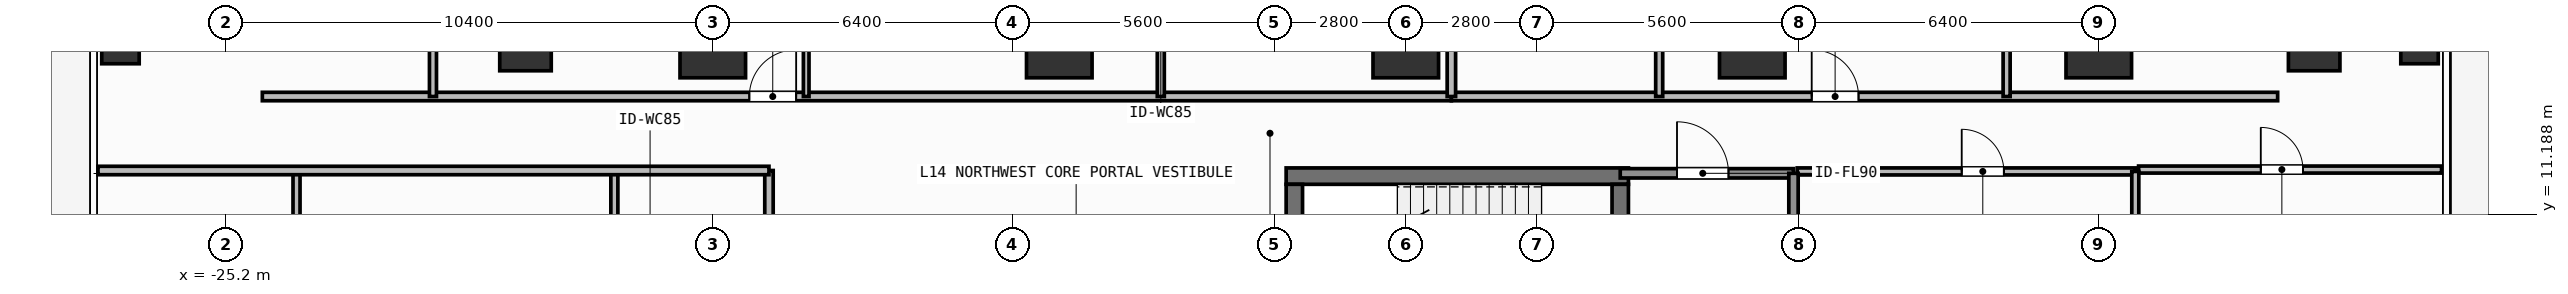
"""IFC4 building model, lengths in metres.
Left out: names, types, materials, properties, quantities, classifications, styles, units other than length and angle.
Written with IfcOpenShell. Run it as: python <this file> out.ifc"""

import sys

from ifc_helpers import new_model, si_unit, direction, frame, frame_2d, origin, origin_2d, place, context, subcontext, project, spatial, rectangle, hollow_rectangle, extrude, element, fill, save


model = new_model("IFC4")
c1 = context("Model", 3, precision=1e-05, world=origin(), true_north=direction((0.0, 1.0)))
c2 = subcontext(c1, "Body", "Model", "MODEL_VIEW")
j1 = project(units=[si_unit("LENGTHUNIT", "METRE"), si_unit("PLANEANGLEUNIT", "RADIAN")], contexts=[c1])
p1 = place(None, origin())
s1 = spatial("IfcSite", under=j1, at=p1, CompositionType="ELEMENT")
p2 = place(p1, origin())
s2 = spatial("IfcBuilding", under=s1, at=p2, CompositionType="ELEMENT")
p3 = place(p2, frame((0.0, 0.0, 54.0)))
s3 = spatial("IfcBuildingStorey", under=s2, at=p3, CompositionType="ELEMENT", Elevation=54.0)
p4 = place(p3, frame((-2.555, 12.0, 0.0), z_axis=(0.0, 0.0, 1.0), x_axis=(1.0, 0.0, 0.0)))
e1 = element("IfcWall", 1, at=p4, inside=s3, PredefinedType="SHEAR", context=c2, shape_type="SweptSolid", body=[
    extrude(rectangle(XDim=7.31, YDim=0.35, at=frame_2d((3.655, 0.0))), origin(), (0.0, 0.0, 1.0), 3.9),
])
p5 = place(p3, frame((-2.38, 8.9, 0.0), z_axis=(0.0, 0.0, 1.0), x_axis=(0.0, 1.0, 0.0)))
e2 = element("IfcWall", 2, at=p5, inside=s3, PredefinedType="SHEAR", context=c2, shape_type="SweptSolid", body=[
    extrude(rectangle(XDim=2.925, YDim=0.35, at=frame_2d((1.462, 0.0))), origin(), (0.0, 0.0, 1.0), 3.9),
])
p6 = place(p3, frame((4.58, 11.825, 0.0), z_axis=(0.0, 0.0, 1.0), x_axis=(0.0, -1.0, 0.0)))
e3 = element("IfcWall", 3, at=p6, inside=s3, PredefinedType="SHEAR", context=c2, shape_type="SweptSolid", body=[
    extrude(rectangle(XDim=2.925, YDim=0.35, at=frame_2d((1.462, 0.0))), origin(), (0.0, 0.0, 1.0), 3.9),
])
p7 = place(p6, frame((0.913, 0.0, 0.0)))
e4 = element("IfcOpeningElement", 4, at=p7, cuts=e3, PredefinedType="OPENING", context=c2, shape_type="SweptSolid", body=[
    extrude(rectangle(XDim=1.1, YDim=2.15, at=frame_2d((0.55, 1.075))), frame((0.0, 0.185, 0.0), z_axis=(0.0, -1.0, 0.0), x_axis=(1.0, 0.0, 0.0)), (0.0, 0.0, 1.0), 0.37),
])
for number, where, z_axis, x_axis in (
    (5, (-14.8, 14.8, 0.0), (0.0, 0.0, 1.0), (1.0, 0.0, 0.0)),
    (6, (-7.4, 14.8, 0.0), (0.0, 0.0, 1.0), (1.0, 0.0, 0.0)),
    (7, (0.0, 14.8, 0.0), (0.0, 0.0, 1.0), (1.0, 0.0, 0.0)),
    (8, (7.4, 14.8, 0.0), (0.0, 0.0, 1.0), (1.0, 0.0, 0.0)),
    (9, (14.8, 14.8, 0.0), (0.0, 0.0, 1.0), (1.0, 0.0, 0.0)),
):
    element("IfcColumn", number, at=place(p3, frame(where, z_axis=z_axis, x_axis=x_axis)), inside=s3, PredefinedType="COLUMN", context=c2, shape_type="SweptSolid", body=[
        extrude(rectangle(XDim=1.4, YDim=1.4, at=origin_2d()), origin(), (0.0, 0.0, 1.0), 3.9),
    ])
for number, where, z_axis, x_axis in (
    (10, (-18.8, 14.8, 0.0), (0.0, 0.0, 1.0), (1.0, 0.0, 0.0)),
    (11, (19.4, 14.8, 0.0), (0.0, 0.0, 1.0), (1.0, 0.0, 0.0)),
):
    element("IfcColumn", number, at=place(p3, frame(where, z_axis=z_axis, x_axis=x_axis)), inside=s3, PredefinedType="COLUMN", context=c2, shape_type="SweptSolid", body=[
        extrude(rectangle(XDim=1.1, YDim=1.1, at=origin_2d()), origin(), (0.0, 0.0, 1.0), 3.9),
    ])
for number, where, z_axis, x_axis in (
    (12, (-27.45, 14.8, 0.0), (0.0, 0.0, 1.0), (1.0, 0.0, 0.0)),
    (13, (21.65, 14.8, 0.0), (0.0, 0.0, 1.0), (1.0, 0.0, 0.0)),
):
    element("IfcColumn", number, at=place(p3, frame(where, z_axis=z_axis, x_axis=x_axis)), inside=s3, PredefinedType="COLUMN", context=c2, shape_type="SweptSolid", body=[
        extrude(hollow_rectangle(XDim=0.8, YDim=0.8, WallThickness=0.036, at=origin_2d()), origin(), (0.0, 0.0, 1.0), 3.9),
    ])
p8 = place(p3, frame((4.58, 12.06, 0.0), z_axis=(0.0, 0.0, 1.0), x_axis=(1.0, 0.0, 0.0)))
e14 = element("IfcWall", 14, at=p8, inside=s3, PredefinedType="SOLIDWALL", context=c2, shape_type="SweptSolid", body=[
    extrude(rectangle(XDim=3.7, YDim=0.2, at=frame_2d((1.85, 0.0))), origin(), (0.0, 0.0, 1.0), 3.68),
])
p9 = place(p8, frame((1.212, 0.0, 0.0)))
e15 = element("IfcOpeningElement", 15, at=p9, cuts=e14, PredefinedType="OPENING", context=c2, shape_type="SweptSolid", body=[
    extrude(rectangle(XDim=1.1, YDim=2.15, at=frame_2d((0.55, 1.075))), frame((0.0, 0.11, 0.0), z_axis=(0.0, -1.0, 0.0), x_axis=(1.0, 0.0, 0.0)), (0.0, 0.0, 1.0), 0.22),
])
p10 = place(p3, frame((8.36, 12.1, 0.0), z_axis=(0.0, 0.0, 1.0), x_axis=(1.0, 0.0, 0.0)))
e16 = element("IfcWall", 16, at=p10, inside=s3, PredefinedType="PARTITIONING", context=c2, shape_type="SweptSolid", body=[
    extrude(rectangle(XDim=7.22, YDim=0.15, at=frame_2d((3.61, 0.0))), origin(), (0.0, 0.0, 1.0), 3.68),
])
p11 = place(p10, frame((3.513, 0.0, 0.0)))
e17 = element("IfcOpeningElement", 17, at=p11, cuts=e16, PredefinedType="OPENING", context=c2, shape_type="SweptSolid", body=[
    extrude(rectangle(XDim=0.9, YDim=2.1, at=frame_2d((0.45, 1.05))), frame((0.0, 0.085, 0.0), z_axis=(0.0, -1.0, 0.0), x_axis=(1.0, 0.0, 0.0)), (0.0, 0.0, 1.0), 0.17),
])
p12 = place(p3, frame((-24.42, 13.7, 0.0), z_axis=(0.0, 0.0, 1.0), x_axis=(1.0, 0.0, 0.0)))
e18 = element("IfcWall", 18, at=p12, inside=s3, PredefinedType="PARTITIONING", context=c2, shape_type="SweptSolid", body=[
    extrude(rectangle(XDim=25.394, YDim=0.18, at=frame_2d((12.697, 0.0))), origin(), (0.0, 0.0, 1.0), 3.68),
])
p13 = place(p12, frame((10.4, 0.0, 0.0)))
e19 = element("IfcOpeningElement", 19, at=p13, cuts=e18, PredefinedType="OPENING", context=c2, shape_type="SweptSolid", body=[
    extrude(rectangle(XDim=1.0, YDim=2.2, at=frame_2d((0.5, 1.1))), frame((0.0, 0.1, 0.0), z_axis=(0.0, -1.0, 0.0), x_axis=(1.0, 0.0, 0.0)), (0.0, 0.0, 1.0), 0.2),
])
p14 = place(p3, frame((-12.805, 13.7, 0.0), z_axis=(0.0, 0.0, 1.0), x_axis=(0.0, 1.0, 0.0)))
e20 = element("IfcWall", 20, at=p14, inside=s3, PredefinedType="PARTITIONING", context=c2, shape_type="SweptSolid", body=[
    extrude(rectangle(XDim=7.09, YDim=0.12, at=frame_2d((3.545, 0.0))), origin(), (0.0, 0.0, 1.0), 3.68),
])
p15 = place(p14, frame((3.006, 0.0, 0.0)))
e21 = element("IfcOpeningElement", 21, at=p15, cuts=e20, PredefinedType="OPENING", context=c2, shape_type="SweptSolid", body=[
    extrude(rectangle(XDim=0.9, YDim=2.1, at=frame_2d((0.45, 1.05))), frame((0.0, 0.07, 0.0), z_axis=(0.0, -1.0, 0.0), x_axis=(1.0, 0.0, 0.0)), (0.0, 0.0, 1.0), 0.14),
])
p16 = place(p3, frame((-20.776, 13.7, 0.0), z_axis=(0.0, 0.0, 1.0), x_axis=(0.0, 1.0, 0.0)))
e22 = element("IfcWall", 22, at=p16, inside=s3, PredefinedType="PARTITIONING", context=c2, shape_type="SweptSolid", body=[
    extrude(rectangle(XDim=7.09, YDim=0.15, at=frame_2d((3.545, 0.0))), origin(), (0.0, 0.0, 1.0), 3.68),
])
p17 = place(p16, frame((3.03, 0.0, 0.0)))
e23 = element("IfcOpeningElement", 23, at=p17, cuts=e22, PredefinedType="OPENING", context=c2, shape_type="SweptSolid", body=[
    extrude(rectangle(XDim=0.85, YDim=2.1, at=frame_2d((0.425, 1.05))), frame((0.0, 0.085, 0.0), z_axis=(0.0, -1.0, 0.0), x_axis=(1.0, 0.0, 0.0)), (0.0, 0.0, 1.0), 0.17),
])
p18 = place(p3, frame((-5.232, 13.7, 0.0), z_axis=(0.0, 0.0, 1.0), x_axis=(0.0, 1.0, 0.0)))
e24 = element("IfcWall", 24, at=p18, inside=s3, PredefinedType="PARTITIONING", context=c2, shape_type="SweptSolid", body=[
    extrude(rectangle(XDim=2.907, YDim=0.15, at=frame_2d((1.454, 0.0))), origin(), (0.0, 0.0, 1.0), 3.68),
])
p19 = place(p18, frame((1.029, 0.0, 0.0)))
e25 = element("IfcOpeningElement", 25, at=p19, cuts=e24, PredefinedType="OPENING", context=c2, shape_type="SweptSolid", body=[
    extrude(rectangle(XDim=0.85, YDim=2.1, at=frame_2d((0.425, 1.05))), frame((0.0, 0.085, 0.0), z_axis=(0.0, -1.0, 0.0), x_axis=(1.0, 0.0, 0.0)), (0.0, 0.0, 1.0), 0.17),
])
p20 = place(p3, frame((0.974, 13.7, 0.0), z_axis=(0.0, 0.0, 1.0), x_axis=(1.0, 0.0, 0.0)))
e26 = element("IfcWall", 26, at=p20, inside=s3, PredefinedType="PARTITIONING", context=c2, shape_type="SweptSolid", body=[
    extrude(rectangle(XDim=17.646, YDim=0.18, at=frame_2d((8.823, 0.0))), origin(), (0.0, 0.0, 1.0), 3.68),
])
p21 = place(p20, frame((7.695, 0.0, 0.0)))
e27 = element("IfcOpeningElement", 27, at=p21, cuts=e26, PredefinedType="OPENING", context=c2, shape_type="SweptSolid", body=[
    extrude(rectangle(XDim=1.0, YDim=2.2, at=frame_2d((0.5, 1.1))), frame((0.0, 0.1, 0.0), z_axis=(0.0, -1.0, 0.0), x_axis=(1.0, 0.0, 0.0)), (0.0, 0.0, 1.0), 0.2),
])
p22 = place(p3, frame((5.412, 13.7, 0.0), z_axis=(0.0, 0.0, 1.0), x_axis=(0.0, 1.0, 0.0)))
e28 = element("IfcWall", 28, at=p22, inside=s3, PredefinedType="PARTITIONING", context=c2, shape_type="SweptSolid", body=[
    extrude(rectangle(XDim=7.09, YDim=0.15, at=frame_2d((3.545, 0.0))), origin(), (0.0, 0.0, 1.0), 3.68),
])
p23 = place(p22, frame((3.03, 0.0, 0.0)))
e29 = element("IfcOpeningElement", 29, at=p23, cuts=e28, PredefinedType="OPENING", context=c2, shape_type="SweptSolid", body=[
    extrude(rectangle(XDim=0.85, YDim=2.1, at=frame_2d((0.425, 1.05))), frame((0.0, 0.085, 0.0), z_axis=(0.0, -1.0, 0.0), x_axis=(1.0, 0.0, 0.0)), (0.0, 0.0, 1.0), 0.17),
])
p24 = place(p3, frame((12.832, 13.7, 0.0), z_axis=(0.0, 0.0, 1.0), x_axis=(0.0, 1.0, 0.0)))
e30 = element("IfcWall", 30, at=p24, inside=s3, PredefinedType="PARTITIONING", context=c2, shape_type="SweptSolid", body=[
    extrude(rectangle(XDim=4.963, YDim=0.15, at=frame_2d((2.481, 0.0))), origin(), (0.0, 0.0, 1.0), 3.68),
])
p25 = place(p24, frame((2.056, 0.0, 0.0)))
e31 = element("IfcOpeningElement", 31, at=p25, cuts=e30, PredefinedType="OPENING", context=c2, shape_type="SweptSolid", body=[
    extrude(rectangle(XDim=0.85, YDim=2.1, at=frame_2d((0.425, 1.05))), frame((0.0, 0.085, 0.0), z_axis=(0.0, -1.0, 0.0), x_axis=(1.0, 0.0, 0.0)), (0.0, 0.0, 1.0), 0.17),
])
p26 = place(p3, frame((-13.6, 4.04, 0.0), z_axis=(0.0, 0.0, 1.0), x_axis=(0.0, 1.0, 0.0)))
e32 = element("IfcWall", 32, at=p26, inside=s3, PredefinedType="PARTITIONING", context=c2, shape_type="SweptSolid", body=[
    extrude(rectangle(XDim=8.08, YDim=0.18, at=frame_2d((4.04, 0.0))), origin(), (0.0, 0.0, 1.0), 3.68),
])
p27 = place(p26, frame((1.583, 0.0, 0.0)))
e33 = element("IfcOpeningElement", 33, at=p27, cuts=e32, PredefinedType="OPENING", context=c2, shape_type="SweptSolid", body=[
    extrude(rectangle(XDim=1.0, YDim=2.2, at=frame_2d((0.5, 1.1))), frame((0.0, 0.1, 0.0), z_axis=(0.0, -1.0, 0.0), x_axis=(1.0, 0.0, 0.0)), (0.0, 0.0, 1.0), 0.2),
])
p28 = place(p3, frame((15.65, 12.14, 0.0), z_axis=(0.0, 0.0, 1.0), x_axis=(1.0, 0.0, 0.0)))
e34 = element("IfcWall", 34, at=p28, inside=s3, PredefinedType="PARTITIONING", context=c2, shape_type="SweptSolid", body=[
    extrude(rectangle(XDim=6.47, YDim=0.15, at=frame_2d((3.235, 0.0))), origin(), (0.0, 0.0, 1.0), 3.68),
])
p29 = place(p28, frame((2.61, 0.0, 0.0)))
e35 = element("IfcOpeningElement", 35, at=p29, cuts=e34, PredefinedType="OPENING", context=c2, shape_type="SweptSolid", body=[
    extrude(rectangle(XDim=0.9, YDim=2.1, at=frame_2d((0.45, 1.05))), frame((0.0, 0.085, 0.0), z_axis=(0.0, -1.0, 0.0), x_axis=(1.0, 0.0, 0.0)), (0.0, 0.0, 1.0), 0.17),
])
p30 = place(p3, frame((8.28, 8.95, 0.0), z_axis=(0.0, 0.0, 1.0), x_axis=(0.0, 1.0, 0.0)))
e36 = element("IfcWall", 36, at=p30, inside=s3, PredefinedType="SOLIDWALL", context=c2, shape_type="SweptSolid", body=[
    extrude(rectangle(XDim=3.11, YDim=0.2, at=frame_2d((1.555, 0.0))), origin(), (0.0, 0.0, 1.0), 3.68),
])
p31 = place(p3, frame((15.58, 5.85, 0.0), z_axis=(0.0, 0.0, 1.0), x_axis=(0.0, 1.0, 0.0)))
e37 = element("IfcWall", 37, at=p31, inside=s3, PredefinedType="PARTITIONING", context=c2, shape_type="SweptSolid", body=[
    extrude(rectangle(XDim=6.25, YDim=0.15, at=frame_2d((3.125, 0.0))), origin(), (0.0, 0.0, 1.0), 3.68),
])
p32 = place(p3, frame((0.974, 13.7, 0.0), z_axis=(0.0, 0.0, 1.0), x_axis=(0.0, 1.0, 0.0)))
e38 = element("IfcWall", 38, at=p32, inside=s3, PredefinedType="PARTITIONING", context=c2, shape_type="SweptSolid", body=[
    extrude(rectangle(XDim=11.33, YDim=0.18, at=frame_2d((5.665, 0.0))), origin(), (0.0, 0.0, 1.0), 3.68),
])
for number, where, z_axis, x_axis in (
    (39, (-16.902, 9.32, 0.0), (0.0, 0.0, 1.0), (0.0, 1.0, 0.0)),
    (40, (-23.69, 9.32, 0.0), (0.0, 0.0, 1.0), (0.0, 1.0, 0.0)),
):
    element("IfcWall", number, at=place(p3, frame(where, z_axis=z_axis, x_axis=x_axis)), inside=s3, PredefinedType="PARTITIONING", context=c2, shape_type="SweptSolid", body=[
        extrude(rectangle(XDim=2.8, YDim=0.15, at=frame_2d((1.4, 0.0))), origin(), (0.0, 0.0, 1.0), 3.68),
    ])
p33 = place(p3, frame((-27.93, 12.12, 0.0), z_axis=(0.0, 0.0, 1.0), x_axis=(1.0, 0.0, 0.0)))
e41 = element("IfcWall", 41, at=p33, inside=s3, PredefinedType="PARTITIONING", context=c2, shape_type="SweptSolid", body=[
    extrude(rectangle(XDim=14.33, YDim=0.18, at=frame_2d((7.165, 0.0))), origin(), (0.0, 0.0, 1.0), 3.68),
])
p34 = place(p9, origin())
e42 = element("IfcDoor", 42, at=p34, inside=s3, OperationType="SINGLE_SWING_LEFT", PredefinedType="DOOR", context=c2, shape_type="SweptSolid", body=[
    extrude(rectangle(XDim=1.1, YDim=2.15, at=frame_2d((0.55, 1.075))), frame((0.0, 0.025, 0.0), z_axis=(0.0, -1.0, 0.0), x_axis=(1.0, 0.0, 0.0)), (0.0, 0.0, 1.0), 0.05),
])
fill(e15, e42)
p35 = place(p11, origin())
e43 = element("IfcDoor", 43, at=p35, inside=s3, OperationType="SINGLE_SWING_LEFT", PredefinedType="DOOR", context=c2, shape_type="SweptSolid", body=[
    extrude(rectangle(XDim=0.9, YDim=2.1, at=frame_2d((0.45, 1.05))), frame((0.0, 0.025, 0.0), z_axis=(0.0, -1.0, 0.0), x_axis=(1.0, 0.0, 0.0)), (0.0, 0.0, 1.0), 0.05),
])
fill(e17, e43)
p36 = place(p13, origin())
e44 = element("IfcDoor", 44, at=p36, inside=s3, OperationType="SINGLE_SWING_RIGHT", PredefinedType="DOOR", context=c2, shape_type="SweptSolid", body=[
    extrude(rectangle(XDim=1.0, YDim=2.2, at=frame_2d((0.5, 1.1))), frame((0.0, 0.025, 0.0), z_axis=(0.0, -1.0, 0.0), x_axis=(1.0, 0.0, 0.0)), (0.0, 0.0, 1.0), 0.05),
])
fill(e19, e44)
p37 = place(p21, origin())
e45 = element("IfcDoor", 45, at=p37, inside=s3, OperationType="SINGLE_SWING_LEFT", PredefinedType="DOOR", context=c2, shape_type="SweptSolid", body=[
    extrude(rectangle(XDim=1.0, YDim=2.2, at=frame_2d((0.5, 1.1))), frame((0.0, 0.025, 0.0), z_axis=(0.0, -1.0, 0.0), x_axis=(1.0, 0.0, 0.0)), (0.0, 0.0, 1.0), 0.05),
])
fill(e27, e45)
p38 = place(p29, origin())
e46 = element("IfcDoor", 46, at=p38, inside=s3, OperationType="SINGLE_SWING_LEFT", PredefinedType="DOOR", context=c2, shape_type="SweptSolid", body=[
    extrude(rectangle(XDim=0.9, YDim=2.1, at=frame_2d((0.45, 1.05))), frame((0.0, 0.025, 0.0), z_axis=(0.0, -1.0, 0.0), x_axis=(1.0, 0.0, 0.0)), (0.0, 0.0, 1.0), 0.05),
])
fill(e35, e46)
save(model, sys.argv[1])
